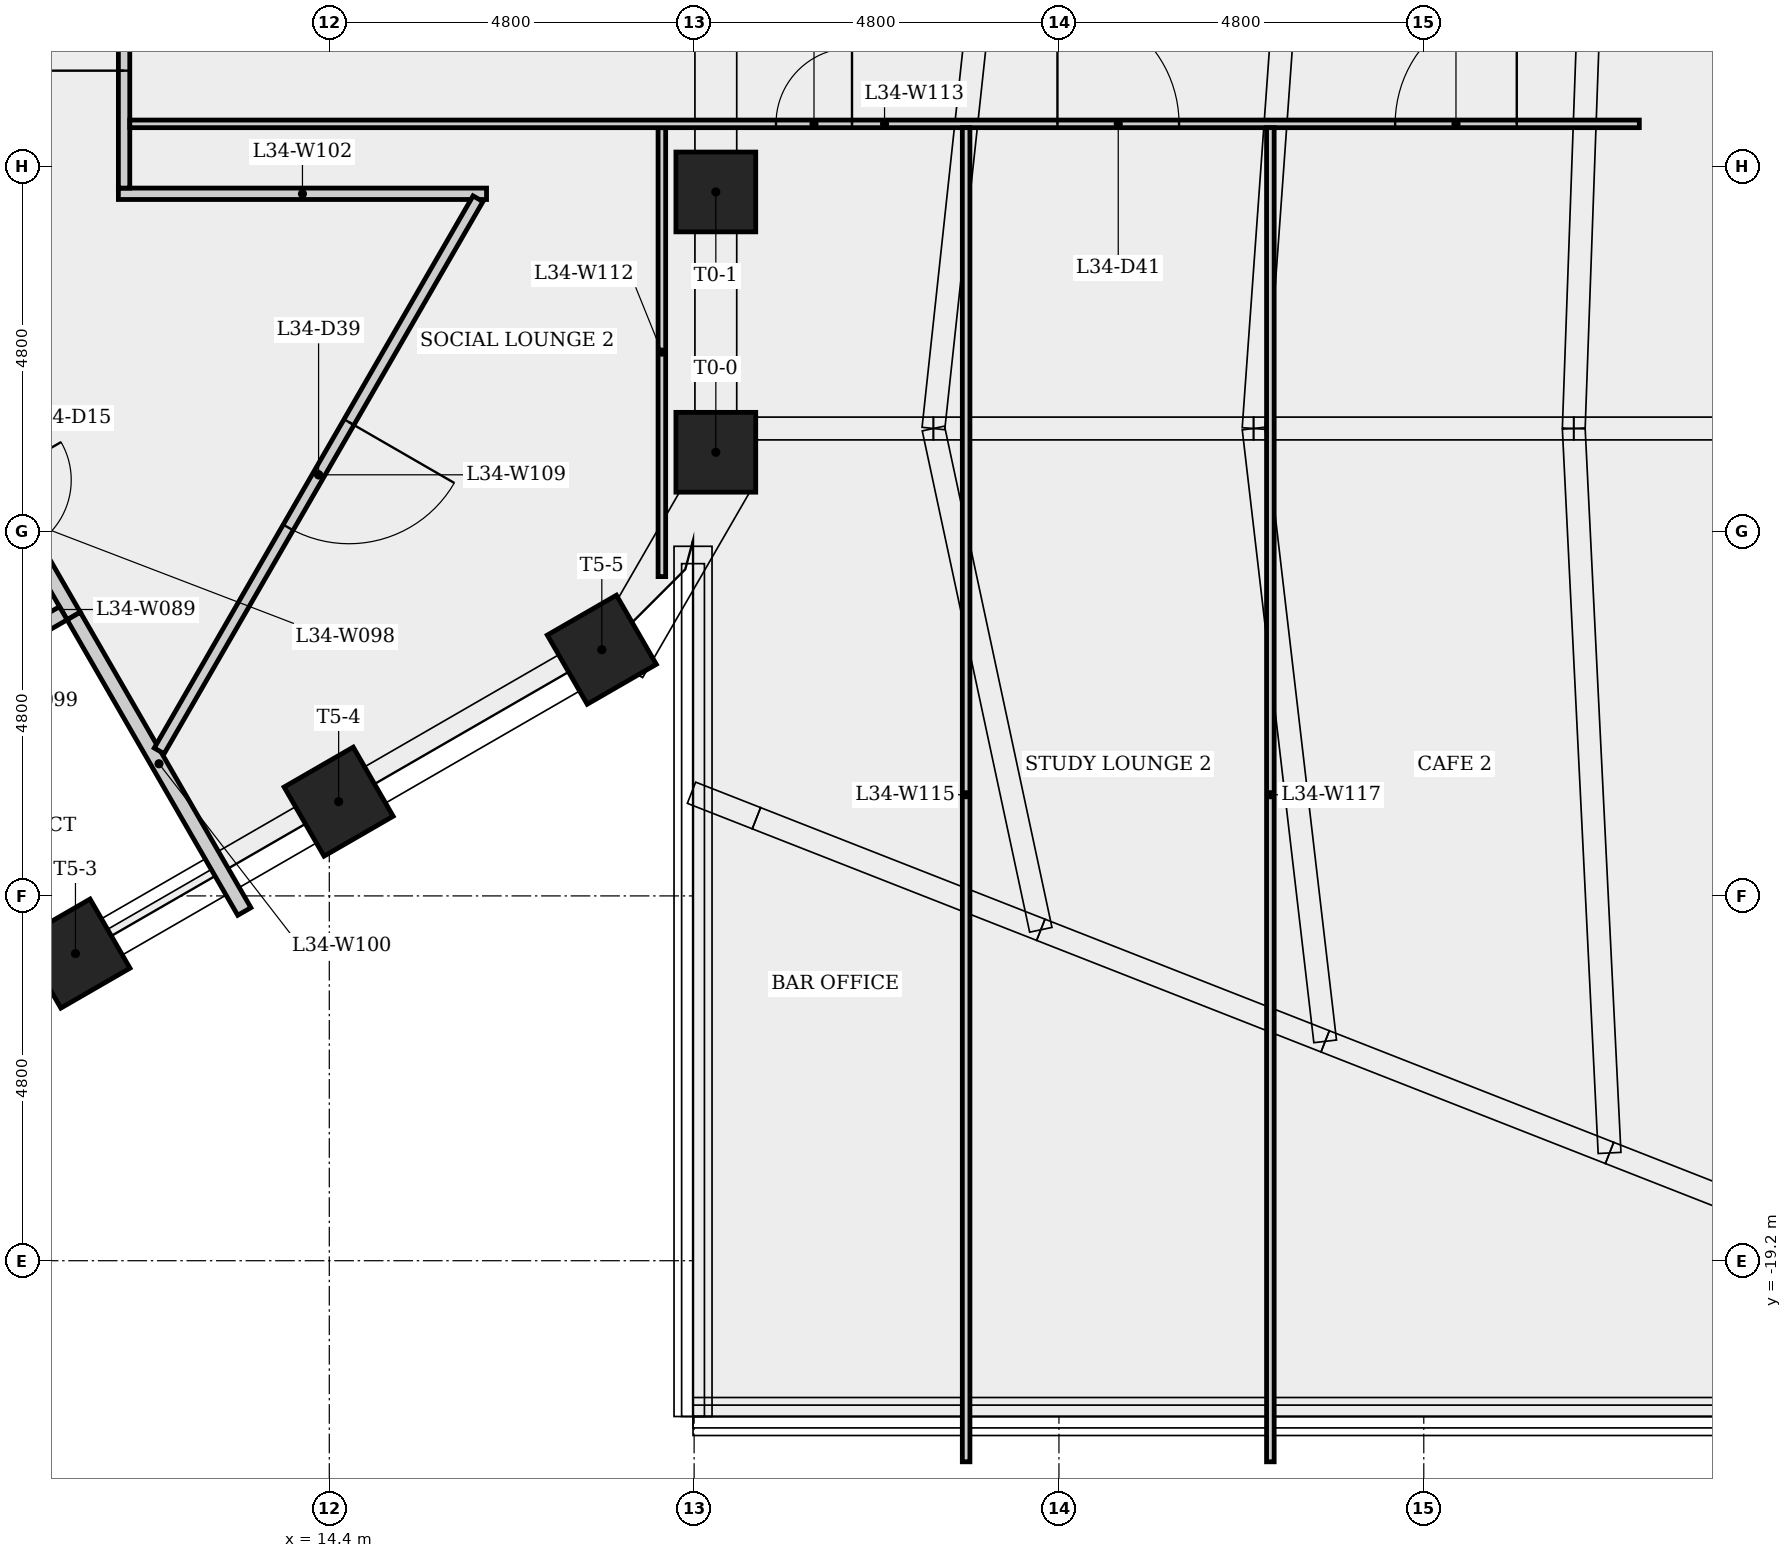
"""IFC4 building model, lengths in metres.
Left out: names, types, materials, properties, quantities, classifications, styles, units other than length and angle.
Written with IfcOpenShell. Run it as: python <this file> out.ifc"""

import sys

from ifc_helpers import new_model, si_unit, direction, frame, frame_2d, origin, origin_2d, place, context, subcontext, project, spatial, rectangle, extrude, element, fill, save


model = new_model("IFC4")
c1 = context("Model", 3, precision=1e-05, world=origin(), true_north=direction((0.0, 1.0)))
c2 = subcontext(c1, "Body", "Model", "MODEL_VIEW")
j1 = project(units=[si_unit("LENGTHUNIT", "METRE"), si_unit("PLANEANGLEUNIT", "RADIAN")], contexts=[c1])
p1 = place(None, origin())
s1 = spatial("IfcSite", under=j1, at=p1, CompositionType="ELEMENT")
p2 = place(p1, origin())
s2 = spatial("IfcBuilding", under=s1, at=p2, CompositionType="ELEMENT")
p3 = place(p2, frame((0.0, 0.0, 128.5)))
s3 = spatial("IfcBuildingStorey", under=s2, at=p3, CompositionType="ELEMENT", Elevation=128.5)
for number, where, z_axis, x_axis in (
    (1, (19.486, -8.562, 0.0), (0.0, 0.0, 1.0), (1.0, 0.0, 0.0)),
    (2, (19.486, -5.137, 0.0), (0.0, 0.0, 1.0), (1.0, 0.0, 0.0)),
    (3, (11.06, -15.159, 0.0), (0.0, 0.0, 1.0), (0.5, -0.866, 0.0)),
    (4, (14.523, -13.16, 0.0), (0.0, 0.0, 1.0), (0.5, -0.866, 0.0)),
    (5, (17.986, -11.161, 0.0), (0.0, 0.0, 1.0), (0.5, -0.866, 0.0)),
):
    element("IfcColumn", number, at=place(p3, frame(where, z_axis=z_axis, x_axis=x_axis)), inside=s3, PredefinedType="COLUMN", context=c2, shape_type="SweptSolid", body=[
        extrude(rectangle(XDim=1.05, YDim=1.05, at=origin_2d()), origin(), (0.0, 0.0, 1.0), 4.0),
    ])
p4 = place(p3, frame((9.537, -8.119, 0.0), z_axis=(0.0, 0.0, 1.0), x_axis=(0.499990139034, -0.866031096941, 0.0)))
e6 = element("IfcWall", 6, at=p4, inside=s3, PredefinedType="PARTITIONING", context=c2, shape_type="SweptSolid", body=[
    extrude(rectangle(XDim=3.0, YDim=0.2, at=frame_2d((1.5, 0.0))), origin(), (0.0, 0.0, 1.0), 3.65),
])
p5 = place(p4, frame((0.935, 0.0, 0.0)))
e7 = element("IfcOpeningElement", 7, at=p5, cuts=e6, PredefinedType="OPENING", context=c2, shape_type="SweptSolid", body=[
    extrude(rectangle(XDim=1.0, YDim=2.1, at=frame_2d((0.5, 1.05))), frame((0.0, 0.11, 0.0), z_axis=(0.0, -1.0, 0.0), x_axis=(1.0, 0.0, 0.0)), (0.0, 0.0, 1.0), 0.22),
])
p6 = place(p3, frame((10.901, -10.681, 0.0), z_axis=(0.0, 0.0, 1.0), x_axis=(-0.866007538022, -0.500030943131, 0.0)))
e8 = element("IfcWall", 8, at=p6, inside=s3, PredefinedType="PLUMBINGWALL", context=c2, shape_type="SweptSolid", body=[
    extrude(rectangle(XDim=2.375, YDim=0.2, at=frame_2d((1.188, 0.0))), origin(), (0.0, 0.0, 1.0), 3.65),
])
p7 = place(p3, frame((11.037, -10.717, 0.0), z_axis=(0.0, 0.0, 1.0), x_axis=(0.500011188759, -0.866018943855, 0.0)))
e9 = element("IfcWall", 9, at=p7, inside=s3, PredefinedType="PLUMBINGWALL", context=c2, shape_type="SweptSolid", body=[
    extrude(rectangle(XDim=4.489, YDim=0.2, at=frame_2d((2.245, 0.0))), origin(), (0.0, 0.0, 1.0), 3.65),
])
p8 = place(p3, frame((11.625, -5.162, 0.0), z_axis=(0.0, 0.0, 1.0), x_axis=(1.0, 0.0, 0.0)))
e10 = element("IfcWall", 10, at=p8, inside=s3, PredefinedType="PARTITIONING", context=c2, shape_type="SweptSolid", body=[
    extrude(rectangle(XDim=4.844, YDim=0.15, at=frame_2d((2.422, 0.0))), origin(), (0.0, 0.0, 1.0), 3.65),
])
p9 = place(p3, frame((11.7, -5.087, 0.0), z_axis=(0.0, 0.0, 1.0), x_axis=(0.0, 1.0, 0.0)))
e11 = element("IfcWall", 11, at=p9, inside=s3, PredefinedType="PARTITIONING", context=c2, shape_type="SweptSolid", body=[
    extrude(rectangle(XDim=10.323, YDim=0.15, at=frame_2d((5.162, 0.0))), origin(), (0.0, 0.0, 1.0), 3.65),
])
p10 = place(p9, frame((1.545, 0.0, 0.0)))
e12 = element("IfcOpeningElement", 12, at=p10, cuts=e11, PredefinedType="OPENING", context=c2, shape_type="SweptSolid", body=[
    extrude(rectangle(XDim=1.6, YDim=2.1, at=frame_2d((0.8, 1.05))), frame((0.0, 0.085, 0.0), z_axis=(0.0, -1.0, 0.0), x_axis=(1.0, 0.0, 0.0)), (0.0, 0.0, 1.0), 0.17),
])
p11 = place(p9, frame((6.262, 0.0, 0.0)))
e13 = element("IfcOpeningElement", 13, at=p11, cuts=e11, PredefinedType="OPENING", context=c2, shape_type="SweptSolid", body=[
    extrude(rectangle(XDim=1.6, YDim=2.1, at=frame_2d((0.8, 1.05))), frame((0.0, 0.085, 0.0), z_axis=(0.0, -1.0, 0.0), x_axis=(1.0, 0.0, 0.0)), (0.0, 0.0, 1.0), 0.17),
])
p12 = place(p3, frame((16.356, -5.227, 0.0), z_axis=(0.0, 0.0, 1.0), x_axis=(-0.500017200592, -0.86601547279, 0.0)))
e14 = element("IfcWall", 14, at=p12, inside=s3, PredefinedType="PARTITIONING", context=c2, shape_type="SweptSolid", body=[
    extrude(rectangle(XDim=8.389, YDim=0.15, at=frame_2d((4.194, 0.0))), origin(), (0.0, 0.0, 1.0), 3.65),
])
p13 = place(p12, frame((3.395, 0.0, 0.0)))
e15 = element("IfcOpeningElement", 15, at=p13, cuts=e14, PredefinedType="OPENING", context=c2, shape_type="SweptSolid", body=[
    extrude(rectangle(XDim=1.6, YDim=2.1, at=frame_2d((0.8, 1.05))), frame((0.0, 0.085, 0.0), z_axis=(0.0, -1.0, 0.0), x_axis=(1.0, 0.0, 0.0)), (0.0, 0.0, 1.0), 0.17),
])
p14 = place(p3, frame((18.776, -4.292, 0.0), z_axis=(0.0, 0.0, 1.0), x_axis=(0.0, -1.0, 0.0)))
e16 = element("IfcWall", 16, at=p14, inside=s3, PredefinedType="PARTITIONING", context=c2, shape_type="SweptSolid", body=[
    extrude(rectangle(XDim=5.907, YDim=0.1, at=frame_2d((2.954, 0.0))), origin(), (0.0, 0.0, 1.0), 3.65),
])
p15 = place(p3, frame((11.775, -4.242, 0.0), z_axis=(0.0, 0.0, 1.0), x_axis=(1.0, 0.0, 0.0)))
e17 = element("IfcWall", 17, at=p15, inside=s3, PredefinedType="PARTITIONING", context=c2, shape_type="SweptSolid", body=[
    extrude(rectangle(XDim=19.861, YDim=0.1, at=frame_2d((9.93, 0.0))), origin(), (0.0, 0.0, 1.0), 3.65),
])
p16 = place(p15, frame((8.502, 0.0, 0.0)))
e18 = element("IfcOpeningElement", 18, at=p16, cuts=e17, PredefinedType="OPENING", context=c2, shape_type="SweptSolid", body=[
    extrude(rectangle(XDim=1.0, YDim=2.1, at=frame_2d((0.5, 1.05))), frame((0.0, 0.06, 0.0), z_axis=(0.0, -1.0, 0.0), x_axis=(1.0, 0.0, 0.0)), (0.0, 0.0, 1.0), 0.12),
])
p17 = place(p15, frame((12.205, 0.0, 0.0)))
e19 = element("IfcOpeningElement", 19, at=p17, cuts=e17, PredefinedType="OPENING", context=c2, shape_type="SweptSolid", body=[
    extrude(rectangle(XDim=1.6, YDim=2.1, at=frame_2d((0.8, 1.05))), frame((0.0, 0.06, 0.0), z_axis=(0.0, -1.0, 0.0), x_axis=(1.0, 0.0, 0.0)), (0.0, 0.0, 1.0), 0.12),
])
p18 = place(p15, frame((16.648, 0.0, 0.0)))
e20 = element("IfcOpeningElement", 20, at=p18, cuts=e17, PredefinedType="OPENING", context=c2, shape_type="SweptSolid", body=[
    extrude(rectangle(XDim=1.6, YDim=2.1, at=frame_2d((0.8, 1.05))), frame((0.0, 0.06, 0.0), z_axis=(0.0, -1.0, 0.0), x_axis=(1.0, 0.0, 0.0)), (0.0, 0.0, 1.0), 0.12),
])
for number, where, z_axis, x_axis in (
    (21, (22.779, -4.292, 0.0), (0.0, 0.0, 1.0), (0.0, -1.0, 0.0)),
    (22, (26.781, -4.292, 0.0), (0.0, 0.0, 1.0), (0.0, -1.0, 0.0)),
):
    element("IfcWall", number, at=place(p3, frame(where, z_axis=z_axis, x_axis=x_axis)), inside=s3, PredefinedType="PARTITIONING", context=c2, shape_type="SweptSolid", body=[
        extrude(rectangle(XDim=17.554, YDim=0.1, at=frame_2d((8.777, 0.0))), origin(), (0.0, 0.0, 1.0), 3.275),
    ])
p19 = place(p10, origin())
e23 = element("IfcDoor", 23, at=p19, inside=s3, OperationType="SINGLE_SWING_LEFT", PredefinedType="DOOR", context=c2, shape_type="SweptSolid", body=[
    extrude(rectangle(XDim=1.6, YDim=2.1, at=frame_2d((0.8, 1.05))), frame((0.0, 0.025, 0.0), z_axis=(0.0, -1.0, 0.0), x_axis=(1.0, 0.0, 0.0)), (0.0, 0.0, 1.0), 0.05),
])
fill(e12, e23)
p20 = place(p13, origin())
e24 = element("IfcDoor", 24, at=p20, inside=s3, OperationType="SINGLE_SWING_LEFT", PredefinedType="DOOR", context=c2, shape_type="SweptSolid", body=[
    extrude(rectangle(XDim=1.6, YDim=2.1, at=frame_2d((0.8, 1.05))), frame((0.0, 0.025, 0.0), z_axis=(0.0, -1.0, 0.0), x_axis=(1.0, 0.0, 0.0)), (0.0, 0.0, 1.0), 0.05),
])
fill(e15, e24)
p21 = place(p16, origin())
e25 = element("IfcDoor", 25, at=p21, inside=s3, OperationType="SINGLE_SWING_RIGHT", PredefinedType="DOOR", context=c2, shape_type="SweptSolid", body=[
    extrude(rectangle(XDim=1.0, YDim=2.1, at=frame_2d((0.5, 1.05))), frame((0.0, 0.025, 0.0), z_axis=(0.0, -1.0, 0.0), x_axis=(1.0, 0.0, 0.0)), (0.0, 0.0, 1.0), 0.05),
])
fill(e18, e25)
p22 = place(p17, origin())
e26 = element("IfcDoor", 26, at=p22, inside=s3, OperationType="SINGLE_SWING_LEFT", PredefinedType="DOOR", context=c2, shape_type="SweptSolid", body=[
    extrude(rectangle(XDim=1.6, YDim=2.1, at=frame_2d((0.8, 1.05))), frame((0.0, 0.025, 0.0), z_axis=(0.0, -1.0, 0.0), x_axis=(1.0, 0.0, 0.0)), (0.0, 0.0, 1.0), 0.05),
])
fill(e19, e26)
p23 = place(p18, origin())
e27 = element("IfcDoor", 27, at=p23, inside=s3, OperationType="SINGLE_SWING_RIGHT", PredefinedType="DOOR", context=c2, shape_type="SweptSolid", body=[
    extrude(rectangle(XDim=1.6, YDim=2.1, at=frame_2d((0.8, 1.05))), frame((0.0, 0.025, 0.0), z_axis=(0.0, -1.0, 0.0), x_axis=(1.0, 0.0, 0.0)), (0.0, 0.0, 1.0), 0.05),
])
fill(e20, e27)
save(model, sys.argv[1])
